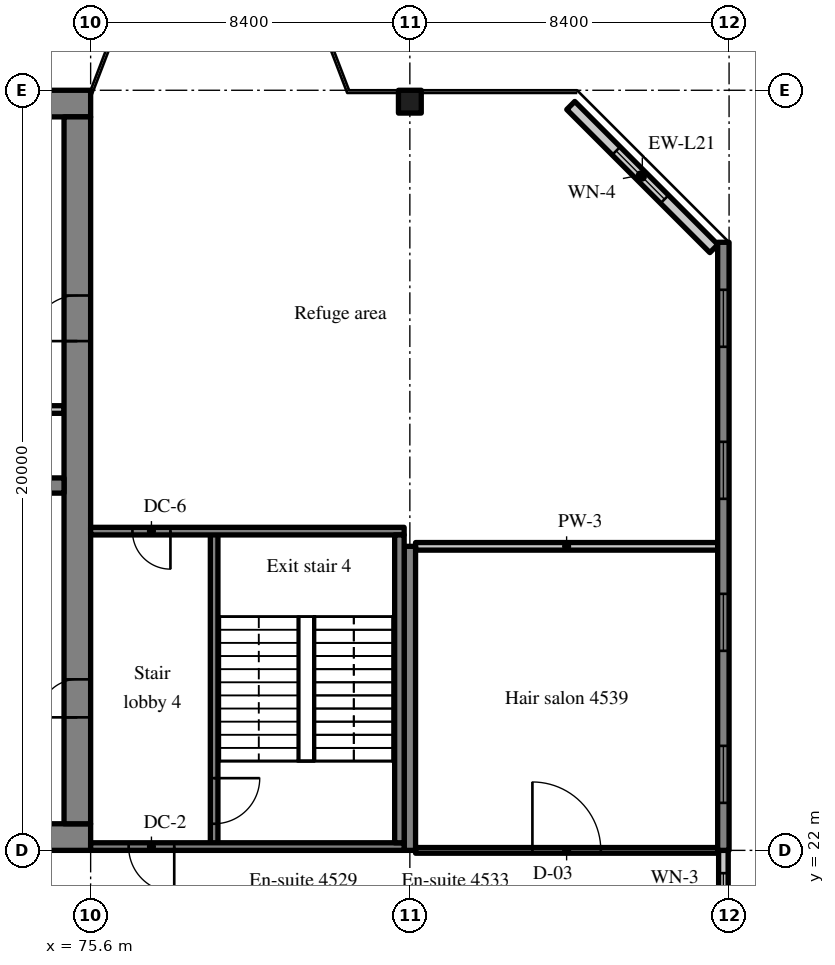
"""IFC4 building model, lengths in metres.
Left out: names, types, materials, properties, quantities, classifications, styles, units other than length and angle.
Written with IfcOpenShell. Run it as: python <this file> out.ifc"""

import sys

from ifc_helpers import new_model, si_unit, direction, frame, frame_2d, origin, origin_2d, place, context, subcontext, project, spatial, rectangle, extrude, source, transform, mapped, element, fill, save


model = new_model("IFC4")
c1 = context("Model", 3, precision=1e-05, world=origin(), true_north=direction((0.0, 1.0)))
c2 = subcontext(c1, "Body", "Model", "MODEL_VIEW")
j1 = project(units=[si_unit("LENGTHUNIT", "METRE"), si_unit("PLANEANGLEUNIT", "RADIAN")], contexts=[c1])
p1 = place(None, origin())
s1 = spatial("IfcSite", under=j1, at=p1, CompositionType="ELEMENT")
p2 = place(p1, origin())
s2 = spatial("IfcBuilding", under=s1, at=p2, CompositionType="ELEMENT")
p3 = place(p2, frame((0.0, 0.0, 185.8)))
s3 = spatial("IfcBuildingStorey", under=s2, at=p3, CompositionType="ELEMENT", Elevation=185.8)
m1 = source(origin(), c2, "Body", "SweptSolid", [
    extrude(rectangle(XDim=50.4, YDim=0.7, at=frame_2d((25.2, 0.0))), origin(), (0.0, 0.0, 1.0), 3.52),
])
p4 = place(p3, frame((25.2, 22.35, 0.0), z_axis=(0.0, 0.0, 1.0), x_axis=(1.0, 0.0, 0.0)))
e1 = element("IfcWall", 1, at=p4, inside=s3, PredefinedType="SHEAR", context=c2, shape_type="MappedRepresentation", body=[
    mapped(m1, transform((0.0, 0.0, 0.0), scale=1.0)),
])
m2 = source(origin(), c2, "Body", "SweptSolid", [
    extrude(rectangle(XDim=1.8, YDim=2.1, at=frame_2d((0.9, 1.05))), frame((0.0, 0.36, 0.0), z_axis=(0.0, -1.0, 0.0), x_axis=(1.0, 0.0, 0.0)), (0.0, 0.0, 1.0), 0.72),
])
p5 = place(p4, frame((15.9, 0.0, 0.0)))
e2 = element("IfcOpeningElement", 2, at=p5, cuts=e1, PredefinedType="OPENING", context=c2, shape_type="MappedRepresentation", body=[
    mapped(m2, transform((0.0, 0.0, 0.0), scale=1.0)),
])
m3 = source(origin(), c2, "Body", "SweptSolid", [
    extrude(rectangle(XDim=0.9, YDim=2.1, at=frame_2d((0.45, 1.05))), frame((0.0, 0.36, 0.0), z_axis=(0.0, -1.0, 0.0), x_axis=(1.0, 0.0, 0.0)), (0.0, 0.0, 1.0), 0.72),
])
p6 = place(p4, frame((9.7, 0.0, 0.0)))
e3 = element("IfcOpeningElement", 3, at=p6, cuts=e1, PredefinedType="OPENING", context=c2, shape_type="MappedRepresentation", body=[
    mapped(m3, transform((0.0, 0.0, 0.0), scale=1.0)),
])
p7 = place(p4, frame((21.5, 0.0, 0.0)))
e4 = element("IfcOpeningElement", 4, at=p7, cuts=e1, PredefinedType="OPENING", context=c2, shape_type="MappedRepresentation", body=[
    mapped(m3, transform((0.0, 0.0, 0.0), scale=1.0)),
])
p8 = place(p4, frame((32.7, 0.0, 0.0)))
e5 = element("IfcOpeningElement", 5, at=p8, cuts=e1, PredefinedType="OPENING", context=c2, shape_type="MappedRepresentation", body=[
    mapped(m2, transform((0.0, 0.0, 0.0), scale=1.0)),
])
m4 = source(origin(), c2, "Body", "SweptSolid", [
    extrude(rectangle(XDim=1.2, YDim=2.1, at=frame_2d((0.6, 1.05))), frame((0.0, 0.36, 0.0), z_axis=(0.0, -1.0, 0.0), x_axis=(1.0, 0.0, 0.0)), (0.0, 0.0, 1.0), 0.72),
])
p9 = place(p4, frame((6.475, 0.0, 0.0)))
e6 = element("IfcOpeningElement", 6, at=p9, cuts=e1, PredefinedType="OPENING", context=c2, shape_type="MappedRepresentation", body=[
    mapped(m4, transform((0.0, 0.0, 0.0), scale=1.0)),
])
p10 = place(p4, frame((47.875, 0.0, 0.0)))
e7 = element("IfcOpeningElement", 7, at=p10, cuts=e1, PredefinedType="OPENING", context=c2, shape_type="MappedRepresentation", body=[
    mapped(m4, transform((0.0, 0.0, 0.0), scale=1.0)),
])
p11 = place(p3, frame((25.2, 41.65, 0.0), z_axis=(0.0, 0.0, 1.0), x_axis=(1.0, 0.0, 0.0)))
e8 = element("IfcWall", 8, at=p11, inside=s3, PredefinedType="SHEAR", context=c2, shape_type="MappedRepresentation", body=[
    mapped(m1, transform((0.0, 0.0, 0.0), scale=1.0)),
])
m5 = source(origin(), c2, "Body", "SweptSolid", [
    extrude(rectangle(XDim=18.6, YDim=0.7, at=frame_2d((9.3, 0.0))), origin(), (0.0, 0.0, 1.0), 3.52),
])
p12 = place(p3, frame((75.25, 22.7, 0.0), z_axis=(0.0, 0.0, 1.0), x_axis=(0.0, 1.0, 0.0)))
e9 = element("IfcWall", 9, at=p12, inside=s3, PredefinedType="SHEAR", context=c2, shape_type="MappedRepresentation", body=[
    mapped(m5, transform((0.0, 0.0, 0.0), scale=1.0)),
])
m6 = source(origin(), c2, "Body", "SweptSolid", [
    extrude(rectangle(XDim=1.0, YDim=2.1, at=frame_2d((0.5, 1.05))), frame((0.0, 0.36, 0.0), z_axis=(0.0, -1.0, 0.0), x_axis=(1.0, 0.0, 0.0)), (0.0, 0.0, 1.0), 0.72),
])
p13 = place(p12, frame((2.8, 0.0, 0.0)))
e10 = element("IfcOpeningElement", 10, at=p13, cuts=e9, PredefinedType="OPENING", context=c2, shape_type="MappedRepresentation", body=[
    mapped(m6, transform((0.0, 0.0, 0.0), scale=1.0)),
])
p14 = place(p12, frame((12.7, 0.0, 0.0)))
e11 = element("IfcOpeningElement", 11, at=p14, cuts=e9, PredefinedType="OPENING", context=c2, shape_type="MappedRepresentation", body=[
    mapped(m4, transform((0.0, 0.0, 0.0), scale=1.0)),
])
m7 = source(origin(), c2, "Body", "SweptSolid", [
    extrude(rectangle(XDim=7.5, YDim=0.4, at=frame_2d((3.75, 0.0))), origin(), (0.0, 0.0, 1.0), 3.52),
])
p15 = place(p3, frame((67.4, 31.6, 0.0), z_axis=(0.0, 0.0, 1.0), x_axis=(1.0, 0.0, 0.0)))
e12 = element("IfcWall", 12, at=p15, inside=s3, PredefinedType="SHEAR", context=c2, shape_type="MappedRepresentation", body=[
    mapped(m7, transform((0.0, 0.0, 0.0), scale=1.0)),
])
m8 = source(origin(), c2, "Body", "SweptSolid", [
    extrude(rectangle(XDim=1.1, YDim=2.1, at=frame_2d((0.55, 1.05))), frame((0.0, 0.21, 0.0), z_axis=(0.0, -1.0, 0.0), x_axis=(1.0, 0.0, 0.0)), (0.0, 0.0, 1.0), 0.42),
])
p16 = place(p15, frame((5.725, 0.0, 0.0)))
e13 = element("IfcOpeningElement", 13, at=p16, cuts=e12, PredefinedType="OPENING", context=c2, shape_type="MappedRepresentation", body=[
    mapped(m8, transform((0.0, 0.0, 0.0), scale=1.0)),
])
m9 = source(origin(), c2, "Body", "SweptSolid", [
    extrude(rectangle(XDim=8.0, YDim=0.3, at=frame_2d((4.0, 0.0))), origin(), (0.0, 0.0, 1.0), 3.52),
])
p17 = place(p3, frame((84.0, 22.0, 0.0), z_axis=(0.0, 0.0, 1.0), x_axis=(0.0, 1.0, 0.0)))
e14 = element("IfcWall", 14, at=p17, inside=s3, PredefinedType="SHEAR", context=c2, shape_type="MappedRepresentation", body=[
    mapped(m9, transform((0.0, 0.0, 0.0), scale=1.0)),
])
m10 = source(origin(), c2, "Body", "SweptSolid", [
    extrude(rectangle(XDim=16.0, YDim=0.3, at=frame_2d((8.0, 0.0))), origin(), (0.0, 0.0, 1.0), 3.52),
])
p18 = place(p3, frame((92.25, 22.0, 0.0), z_axis=(0.0, 0.0, 1.0), x_axis=(0.0, 1.0, 0.0)))
e15 = element("IfcWall", 15, at=p18, inside=s3, PredefinedType="SHEAR", context=c2, shape_type="MappedRepresentation", body=[
    mapped(m10, transform((0.0, 0.0, 0.0), scale=1.0)),
])
m11 = source(origin(), c2, "Body", "SweptSolid", [
    extrude(rectangle(XDim=1.5, YDim=1.5, at=frame_2d((0.75, 0.75))), frame((0.0, 0.16, 0.0), z_axis=(0.0, -1.0, 0.0), x_axis=(1.0, 0.0, 0.0)), (0.0, 0.0, 1.0), 0.32),
])
p19 = place(p18, frame((1.25, 0.0, 0.9)))
e16 = element("IfcOpeningElement", 16, at=p19, cuts=e15, PredefinedType="OPENING", context=c2, shape_type="MappedRepresentation", body=[
    mapped(m11, transform((0.0, 0.0, 0.0), scale=1.0)),
])
p20 = place(p18, frame((5.25, 0.0, 0.9)))
e17 = element("IfcOpeningElement", 17, at=p20, cuts=e15, PredefinedType="OPENING", context=c2, shape_type="MappedRepresentation", body=[
    mapped(m11, transform((0.0, 0.0, 0.0), scale=1.0)),
])
p21 = place(p18, frame((9.25, 0.0, 0.9)))
e18 = element("IfcOpeningElement", 18, at=p21, cuts=e15, PredefinedType="OPENING", context=c2, shape_type="MappedRepresentation", body=[
    mapped(m11, transform((0.0, 0.0, 0.0), scale=1.0)),
])
p22 = place(p18, frame((13.25, 0.0, 0.9)))
e19 = element("IfcOpeningElement", 19, at=p22, cuts=e15, PredefinedType="OPENING", context=c2, shape_type="MappedRepresentation", body=[
    mapped(m11, transform((0.0, 0.0, 0.0), scale=1.0)),
])
m12 = source(origin(), c2, "Body", "SweptSolid", [
    extrude(rectangle(XDim=0.6, YDim=0.6, at=origin_2d()), origin(), (0.0, 0.0, 1.0), 3.52),
])
p23 = place(p3, frame((84.0, 41.7, 0.0), z_axis=(0.0, 0.0, 1.0), x_axis=(1.0, 0.0, 0.0)))
e20 = element("IfcColumn", 20, at=p23, inside=s3, PredefinedType="COLUMN", context=c2, shape_type="MappedRepresentation", body=[
    mapped(m12, transform((0.0, 0.0, 0.0), scale=1.0)),
])
m13 = source(origin(), c2, "Body", "SweptSolid", [
    extrude(rectangle(XDim=5.326, YDim=0.3, at=frame_2d((2.663, 0.0))), origin(), (0.0, 0.0, 1.0), 3.52),
])
p24 = place(p3, frame((92.0, 37.834, 0.0), z_axis=(0.0, 0.0, 1.0), x_axis=(-0.707083859269, 0.707129702361, 0.0)))
e21 = element("IfcWall", 21, at=p24, inside=s3, PredefinedType="SOLIDWALL", context=c2, shape_type="MappedRepresentation", body=[
    mapped(m13, transform((0.0, 0.0, 0.0), scale=1.0)),
])
m14 = source(origin(), c2, "Body", "SweptSolid", [
    extrude(rectangle(XDim=1.8, YDim=1.5, at=frame_2d((0.9, 0.75))), frame((0.0, 0.16, 0.0), z_axis=(0.0, -1.0, 0.0), x_axis=(1.0, 0.0, 0.0)), (0.0, 0.0, 1.0), 0.32),
])
p25 = place(p24, frame((1.836, 0.0, 0.9)))
e22 = element("IfcOpeningElement", 22, at=p25, cuts=e21, PredefinedType="OPENING", context=c2, shape_type="MappedRepresentation", body=[
    mapped(m14, transform((0.0, 0.0, 0.0), scale=1.0)),
])
m15 = source(origin(), c2, "Body", "SweptSolid", [
    extrude(rectangle(XDim=2.4, YDim=0.25, at=frame_2d((1.2, 0.0))), origin(), (0.0, 0.0, 1.0), 2.62),
])
p26 = place(p3, frame((92.25, 19.6, 0.0), z_axis=(0.0, 0.0, 1.0), x_axis=(0.0, 1.0, 0.0)))
e23 = element("IfcWall", 23, at=p26, inside=s3, PredefinedType="SOLIDWALL", context=c2, shape_type="MappedRepresentation", body=[
    mapped(m15, transform((0.0, 0.0, 0.0), scale=1.0)),
])
m16 = source(origin(), c2, "Body", "SweptSolid", [
    extrude(rectangle(XDim=1.2, YDim=1.5, at=frame_2d((0.6, 0.75))), frame((0.0, 0.135, 0.0), z_axis=(0.0, -1.0, 0.0), x_axis=(1.0, 0.0, 0.0)), (0.0, 0.0, 1.0), 0.27),
])
p27 = place(p26, frame((0.6, 0.0, 0.9)))
e24 = element("IfcOpeningElement", 24, at=p27, cuts=e23, PredefinedType="OPENING", context=c2, shape_type="MappedRepresentation", body=[
    mapped(m16, transform((0.0, 0.0, 0.0), scale=1.0)),
])
m17 = source(origin(), c2, "Body", "SweptSolid", [
    extrude(rectangle(XDim=2.45, YDim=0.2, at=frame_2d((1.225, 0.0))), origin(), (0.0, 0.0, 1.0), 3.52),
])
p28 = place(p3, frame((72.45, 33.6, 0.0), z_axis=(0.0, 0.0, 1.0), x_axis=(1.0, 0.0, 0.0)))
e25 = element("IfcWall", 25, at=p28, inside=s3, PredefinedType="SOLIDWALL", context=c2, shape_type="MappedRepresentation", body=[
    mapped(m17, transform((0.0, 0.0, 0.0), scale=1.0)),
])
m18 = source(origin(), c2, "Body", "SweptSolid", [
    extrude(rectangle(XDim=8.3, YDim=0.2, at=frame_2d((4.15, 0.0))), origin(), (0.0, 0.0, 1.0), 3.52),
])
p29 = place(p3, frame((78.85, 22.1, 0.0), z_axis=(0.0, 0.0, 1.0), x_axis=(0.0, 1.0, 0.0)))
e26 = element("IfcWall", 26, at=p29, inside=s3, PredefinedType="SOLIDWALL", context=c2, shape_type="MappedRepresentation", body=[
    mapped(m18, transform((0.0, 0.0, 0.0), scale=1.0)),
])
m19 = source(origin(), c2, "Body", "SweptSolid", [
    extrude(rectangle(XDim=1.2, YDim=2.1, at=frame_2d((0.6, 1.05))), frame((0.0, 0.11, 0.0), z_axis=(0.0, -1.0, 0.0), x_axis=(1.0, 0.0, 0.0)), (0.0, 0.0, 1.0), 0.22),
])
p30 = place(p29, frame((0.6, 0.0, 0.0)))
e27 = element("IfcOpeningElement", 27, at=p30, cuts=e26, PredefinedType="OPENING", context=c2, shape_type="MappedRepresentation", body=[
    mapped(m19, transform((0.0, 0.0, 0.0), scale=1.0)),
])
m20 = source(origin(), c2, "Body", "SweptSolid", [
    extrude(rectangle(XDim=8.25, YDim=0.2, at=frame_2d((4.125, 0.0))), origin(), (0.0, 0.0, 1.0), 3.52),
])
p31 = place(p3, frame((83.85, 22.1, 0.0), z_axis=(0.0, 0.0, 1.0), x_axis=(-1.0, 0.0, 0.0)))
e28 = element("IfcWall", 28, at=p31, inside=s3, PredefinedType="SOLIDWALL", context=c2, shape_type="MappedRepresentation", body=[
    mapped(m20, transform((0.0, 0.0, 0.0), scale=1.0)),
])
p32 = place(p31, frame((6.05, 0.0, 0.0)))
e29 = element("IfcOpeningElement", 29, at=p32, cuts=e28, PredefinedType="OPENING", context=c2, shape_type="MappedRepresentation", body=[
    mapped(m19, transform((0.0, 0.0, 0.0), scale=1.0)),
])
p33 = place(p3, frame((83.85, 30.4, 0.0), z_axis=(0.0, 0.0, 1.0), x_axis=(-1.0, 0.0, 0.0)))
e30 = element("IfcWall", 30, at=p33, inside=s3, PredefinedType="SOLIDWALL", context=c2, shape_type="MappedRepresentation", body=[
    mapped(m20, transform((0.0, 0.0, 0.0), scale=1.0)),
])
m21 = source(origin(), c2, "Body", "SweptSolid", [
    extrude(rectangle(XDim=1.0, YDim=2.1, at=frame_2d((0.5, 1.05))), frame((0.0, 0.11, 0.0), z_axis=(0.0, -1.0, 0.0), x_axis=(1.0, 0.0, 0.0)), (0.0, 0.0, 1.0), 0.22),
])
p34 = place(p33, frame((6.15, 0.0, 0.0)))
e31 = element("IfcOpeningElement", 31, at=p34, cuts=e30, PredefinedType="OPENING", context=c2, shape_type="MappedRepresentation", body=[
    mapped(m21, transform((0.0, 0.0, 0.0), scale=1.0)),
])
m22 = source(origin(), c2, "Body", "SweptSolid", [
    extrude(rectangle(XDim=8.1, YDim=0.25, at=frame_2d((4.05, 0.0))), origin(), (0.0, 0.0, 1.0), 3.52),
])
p35 = place(p3, frame((83.725, 22.2, 0.0), z_axis=(0.0, 0.0, 1.0), x_axis=(0.0, 1.0, 0.0)))
e32 = element("IfcWall", 32, at=p35, inside=s3, PredefinedType="SOLIDWALL", context=c2, shape_type="MappedRepresentation", body=[
    mapped(m22, transform((0.0, 0.0, 0.0), scale=1.0)),
])
m23 = source(origin(), c2, "Body", "SweptSolid", [
    extrude(rectangle(XDim=7.95, YDim=0.15, at=frame_2d((3.975, 0.0))), origin(), (0.0, 0.0, 1.0), 2.82),
])
p36 = place(p3, frame((84.15, 22.0, 0.0), z_axis=(0.0, 0.0, 1.0), x_axis=(1.0, 0.0, 0.0)))
e33 = element("IfcWall", 33, at=p36, inside=s3, PredefinedType="PARTITIONING", context=c2, shape_type="MappedRepresentation", body=[
    mapped(m23, transform((0.0, 0.0, 0.0), scale=1.0)),
])
m24 = source(origin(), c2, "Body", "SweptSolid", [
    extrude(rectangle(XDim=1.8, YDim=2.1, at=frame_2d((0.9, 1.05))), frame((0.0, 0.085, 0.0), z_axis=(0.0, -1.0, 0.0), x_axis=(1.0, 0.0, 0.0)), (0.0, 0.0, 1.0), 0.17),
])
p37 = place(p36, frame((3.075, 0.0, 0.0)))
e34 = element("IfcOpeningElement", 34, at=p37, cuts=e33, PredefinedType="OPENING", context=c2, shape_type="MappedRepresentation", body=[
    mapped(m24, transform((0.0, 0.0, 0.0), scale=1.0)),
])
m25 = source(origin(), c2, "Body", "SweptSolid", [
    extrude(rectangle(XDim=7.95, YDim=0.2, at=frame_2d((3.975, 0.0))), origin(), (0.0, 0.0, 1.0), 3.52),
])
p38 = place(p3, frame((84.15, 30.0, 0.0), z_axis=(0.0, 0.0, 1.0), x_axis=(1.0, 0.0, 0.0)))
e35 = element("IfcWall", 35, at=p38, inside=s3, PredefinedType="PARTITIONING", context=c2, shape_type="MappedRepresentation", body=[
    mapped(m25, transform((0.0, 0.0, 0.0), scale=1.0)),
])
m26 = source(origin(), c2, "Body", "SweptSolid", [
    extrude(rectangle(XDim=1.8, YDim=1.5, at=frame_2d((0.9, 0.75))), frame((0.0, 0.03, 0.0), z_axis=(0.0, -1.0, 0.0), x_axis=(1.0, 0.0, 0.0)), (0.0, 0.0, 1.0), 0.06),
])
p39 = place(p25, origin())
e36 = element("IfcWindow", 36, at=p39, inside=s3, PartitioningType="SINGLE_PANEL", PredefinedType="WINDOW", context=c2, shape_type="MappedRepresentation", body=[
    mapped(m26, transform((0.0, 0.0, 0.0), scale=1.0)),
])
fill(e22, e36)
m27 = source(origin(), c2, "Body", "SweptSolid", [
    extrude(rectangle(XDim=1.5, YDim=1.5, at=frame_2d((0.75, 0.75))), frame((0.0, 0.03, 0.0), z_axis=(0.0, -1.0, 0.0), x_axis=(1.0, 0.0, 0.0)), (0.0, 0.0, 1.0), 0.06),
])
p40 = place(p19, origin())
e37 = element("IfcWindow", 37, at=p40, inside=s3, PartitioningType="SINGLE_PANEL", PredefinedType="WINDOW", context=c2, shape_type="MappedRepresentation", body=[
    mapped(m27, transform((0.0, 0.0, 0.0), scale=1.0)),
])
fill(e16, e37)
p41 = place(p20, origin())
e38 = element("IfcWindow", 38, at=p41, inside=s3, PartitioningType="SINGLE_PANEL", PredefinedType="WINDOW", context=c2, shape_type="MappedRepresentation", body=[
    mapped(m27, transform((0.0, 0.0, 0.0), scale=1.0)),
])
fill(e17, e38)
p42 = place(p21, origin())
e39 = element("IfcWindow", 39, at=p42, inside=s3, PartitioningType="SINGLE_PANEL", PredefinedType="WINDOW", context=c2, shape_type="MappedRepresentation", body=[
    mapped(m27, transform((0.0, 0.0, 0.0), scale=1.0)),
])
fill(e18, e39)
p43 = place(p22, origin())
e40 = element("IfcWindow", 40, at=p43, inside=s3, PartitioningType="SINGLE_PANEL", PredefinedType="WINDOW", context=c2, shape_type="MappedRepresentation", body=[
    mapped(m27, transform((0.0, 0.0, 0.0), scale=1.0)),
])
fill(e19, e40)
m28 = source(origin(), c2, "Body", "SweptSolid", [
    extrude(rectangle(XDim=1.2, YDim=1.5, at=frame_2d((0.6, 0.75))), frame((0.0, 0.03, 0.0), z_axis=(0.0, -1.0, 0.0), x_axis=(1.0, 0.0, 0.0)), (0.0, 0.0, 1.0), 0.06),
])
p44 = place(p27, origin())
e41 = element("IfcWindow", 41, at=p44, inside=s3, PartitioningType="SINGLE_PANEL", PredefinedType="WINDOW", context=c2, shape_type="MappedRepresentation", body=[
    mapped(m28, transform((0.0, 0.0, 0.0), scale=1.0)),
])
fill(e24, e41)
m29 = source(origin(), c2, "Body", "SweptSolid", [
    extrude(rectangle(XDim=1.0, YDim=2.1, at=frame_2d((0.5, 1.05))), frame((0.0, 0.025, 0.0), z_axis=(0.0, -1.0, 0.0), x_axis=(1.0, 0.0, 0.0)), (0.0, 0.0, 1.0), 0.05),
])
p45 = place(p13, origin())
e42 = element("IfcDoor", 42, at=p45, inside=s3, OperationType="SINGLE_SWING_LEFT", PredefinedType="DOOR", context=c2, shape_type="MappedRepresentation", body=[
    mapped(m29, transform((0.0, 0.0, 0.0), scale=1.0)),
])
fill(e10, e42)
m30 = source(origin(), c2, "Body", "SweptSolid", [
    extrude(rectangle(XDim=1.2, YDim=2.1, at=frame_2d((0.6, 1.05))), frame((0.0, 0.025, 0.0), z_axis=(0.0, -1.0, 0.0), x_axis=(1.0, 0.0, 0.0)), (0.0, 0.0, 1.0), 0.05),
])
p46 = place(p14, origin())
e43 = element("IfcDoor", 43, at=p46, inside=s3, OperationType="SINGLE_SWING_LEFT", PredefinedType="DOOR", context=c2, shape_type="MappedRepresentation", body=[
    mapped(m30, transform((0.0, 0.0, 0.0), scale=1.0)),
])
fill(e11, e43)
p47 = place(p30, origin())
e44 = element("IfcDoor", 44, at=p47, inside=s3, OperationType="SINGLE_SWING_RIGHT", PredefinedType="DOOR", context=c2, shape_type="MappedRepresentation", body=[
    mapped(m30, transform((0.0, 0.0, 0.0), scale=1.0)),
])
fill(e27, e44)
p48 = place(p32, origin())
e45 = element("IfcDoor", 45, at=p48, inside=s3, OperationType="SINGLE_SWING_LEFT", PredefinedType="DOOR", context=c2, shape_type="MappedRepresentation", body=[
    mapped(m30, transform((0.0, 0.0, 0.0), scale=1.0)),
])
fill(e29, e45)
p49 = place(p34, origin())
e46 = element("IfcDoor", 46, at=p49, inside=s3, OperationType="SINGLE_SWING_LEFT", PredefinedType="DOOR", context=c2, shape_type="MappedRepresentation", body=[
    mapped(m29, transform((0.0, 0.0, 0.0), scale=1.0)),
])
fill(e31, e46)
m31 = source(origin(), c2, "Body", "SweptSolid", [
    extrude(rectangle(XDim=1.8, YDim=2.1, at=frame_2d((0.9, 1.05))), frame((0.0, 0.025, 0.0), z_axis=(0.0, -1.0, 0.0), x_axis=(1.0, 0.0, 0.0)), (0.0, 0.0, 1.0), 0.05),
])
p50 = place(p37, origin())
e47 = element("IfcDoor", 47, at=p50, inside=s3, OperationType="DOUBLE_DOOR_SINGLE_SWING", PredefinedType="DOOR", context=c2, shape_type="MappedRepresentation", body=[
    mapped(m31, transform((0.0, 0.0, 0.0), scale=1.0)),
])
fill(e34, e47)
save(model, sys.argv[1])
